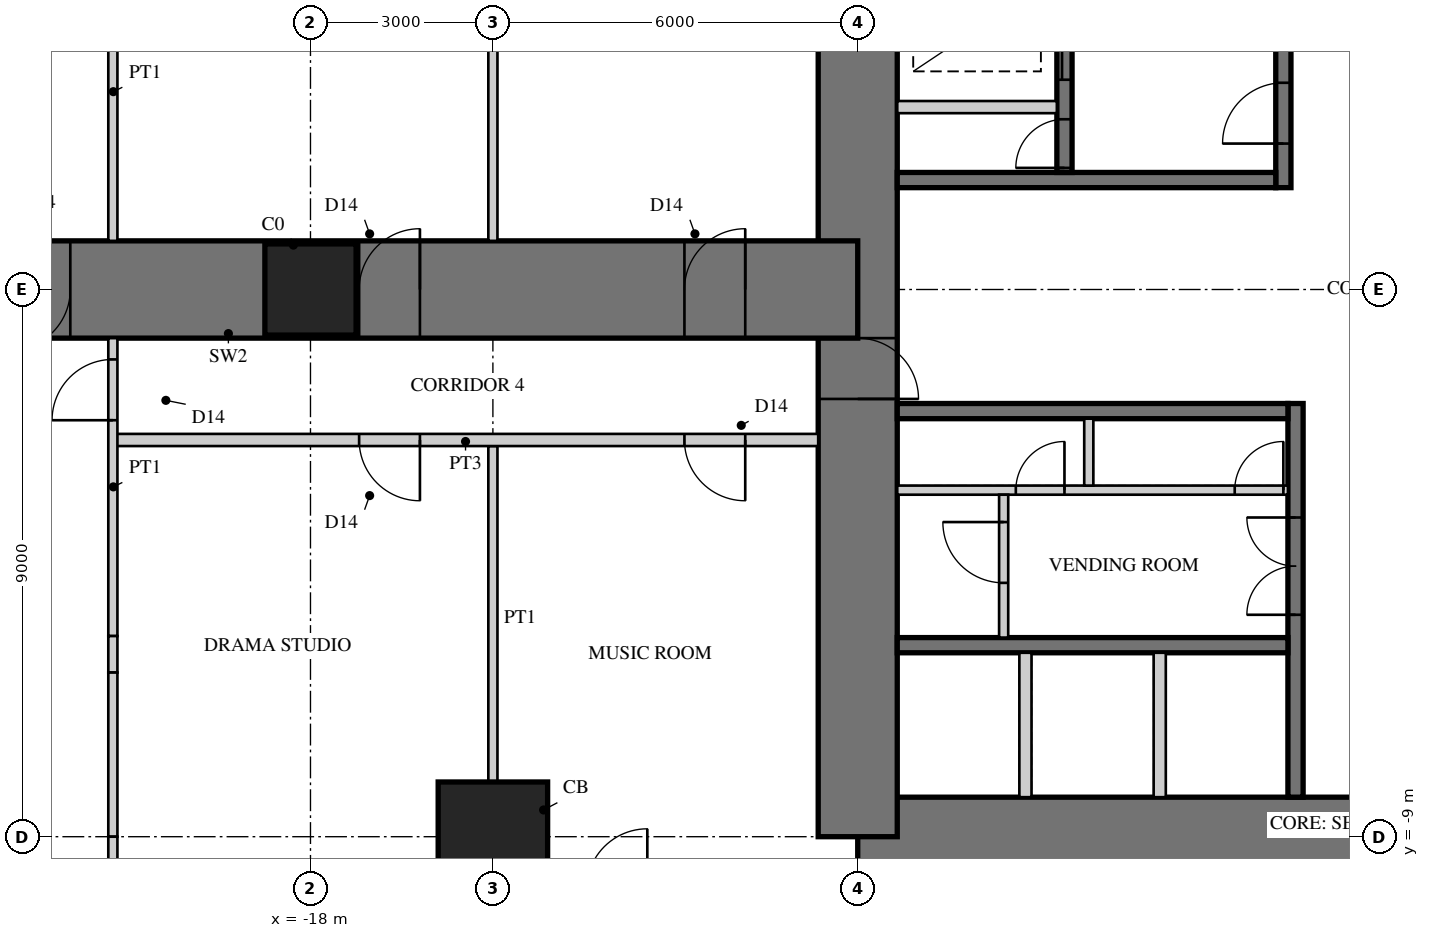
"""IFC4 building model, lengths in metres.
Left out: names, types, materials, properties, quantities, classifications, styles, units other than length and angle.
Written with IfcOpenShell. Run it as: python <this file> out.ifc"""

import sys

from ifc_helpers import new_model, si_unit, direction, frame, frame_2d, origin, origin_2d, place, context, subcontext, project, spatial, rectangle, extrude, element, fill, save


model = new_model("IFC4")
c1 = context("Model", 3, precision=1e-05, world=origin(), true_north=direction((0.0, 1.0)))
c2 = subcontext(c1, "Body", "Model", "MODEL_VIEW")
j1 = project(units=[si_unit("LENGTHUNIT", "METRE"), si_unit("PLANEANGLEUNIT", "RADIAN")], contexts=[c1])
p1 = place(None, origin())
s1 = spatial("IfcSite", under=j1, at=p1, CompositionType="ELEMENT")
p2 = place(p1, origin())
s2 = spatial("IfcBuilding", under=s1, at=p2, CompositionType="ELEMENT")
p3 = place(p2, frame((0.0, 0.0, 14.0)))
s3 = spatial("IfcBuildingStorey", under=s2, at=p3, CompositionType="ELEMENT", Elevation=14.0)
p4 = place(p3, frame((-9.0, -9.0, 0.0), z_axis=(0.0, 0.0, 1.0), x_axis=(1.0, 0.0, 0.0)))
e1 = element("IfcWall", 1, at=p4, inside=s3, PredefinedType="SHEAR", context=c2, shape_type="SweptSolid", body=[
    extrude(rectangle(XDim=18.0, YDim=1.3, at=frame_2d((9.0, 0.0))), origin(), (0.0, 0.0, 1.0), 4.5),
])
p5 = place(p4, frame((9.8, 0.0, 0.0)))
e2 = element("IfcOpeningElement", 2, at=p5, cuts=e1, PredefinedType="OPENING", context=c2, shape_type="SweptSolid", body=[
    extrude(rectangle(XDim=1.0, YDim=2.4, at=frame_2d((0.5, 1.2))), frame((0.0, 0.66, 0.0), z_axis=(0.0, -1.0, 0.0), x_axis=(1.0, 0.0, 0.0)), (0.0, 0.0, 1.0), 1.32),
])
p6 = place(p3, frame((-9.0, 9.0, 0.0), z_axis=(0.0, 0.0, 1.0), x_axis=(0.0, -1.0, 0.0)))
e3 = element("IfcWall", 3, at=p6, inside=s3, PredefinedType="SHEAR", context=c2, shape_type="SweptSolid", body=[
    extrude(rectangle(XDim=18.0, YDim=1.3, at=frame_2d((9.0, 0.0))), origin(), (0.0, 0.0, 1.0), 4.5),
])
p7 = place(p6, frame((9.8, 0.0, 0.0)))
e4 = element("IfcOpeningElement", 4, at=p7, cuts=e3, PredefinedType="OPENING", context=c2, shape_type="SweptSolid", body=[
    extrude(rectangle(XDim=1.0, YDim=2.4, at=frame_2d((0.5, 1.2))), frame((0.0, 0.66, 0.0), z_axis=(0.0, -1.0, 0.0), x_axis=(1.0, 0.0, 0.0)), (0.0, 0.0, 1.0), 1.32),
])
p8 = place(p3, frame((-2.0, 1.675, 0.0), z_axis=(0.0, 0.0, 1.0), x_axis=(0.0, 1.0, 0.0)))
e5 = element("IfcWall", 5, at=p8, inside=s3, PredefinedType="SHEAR", context=c2, shape_type="SweptSolid", body=[
    extrude(rectangle(XDim=6.675, YDim=0.25, at=frame_2d((3.337, 0.0))), origin(), (0.0, 0.0, 1.0), 4.5),
])
p9 = place(p8, frame((0.725, 0.0, 0.0)))
e6 = element("IfcOpeningElement", 6, at=p9, cuts=e5, PredefinedType="OPENING", context=c2, shape_type="SweptSolid", body=[
    extrude(rectangle(XDim=1.0, YDim=2.1, at=frame_2d((0.5, 1.05))), frame((0.0, 0.135, 0.0), z_axis=(0.0, -1.0, 0.0), x_axis=(1.0, 0.0, 0.0)), (0.0, 0.0, 1.0), 0.27),
])
p10 = place(p3, frame((-2.125, 1.8, 0.0), z_axis=(0.0, 0.0, 1.0), x_axis=(-1.0, 0.0, 0.0)))
e7 = element("IfcWall", 7, at=p10, inside=s3, PredefinedType="SHEAR", context=c2, shape_type="SweptSolid", body=[
    extrude(rectangle(XDim=6.225, YDim=0.25, at=frame_2d((3.113, 0.0))), origin(), (0.0, 0.0, 1.0), 4.5),
])
p11 = place(p3, frame((-5.6, 1.925, 0.0), z_axis=(0.0, 0.0, 1.0), x_axis=(0.0, 1.0, 0.0)))
e8 = element("IfcWall", 8, at=p11, inside=s3, PredefinedType="SHEAR", context=c2, shape_type="SweptSolid", body=[
    extrude(rectangle(XDim=3.55, YDim=0.25, at=frame_2d((1.775, 0.0))), origin(), (0.0, 0.0, 1.0), 4.5),
])
p12 = place(p11, frame((1.525, 0.0, 0.0)))
e9 = element("IfcOpeningElement", 9, at=p12, cuts=e8, PredefinedType="OPENING", context=c2, shape_type="SweptSolid", body=[
    extrude(rectangle(XDim=1.1, YDim=2.2, at=frame_2d((0.55, 1.1))), frame((0.0, 0.135, 0.0), z_axis=(0.0, -1.0, 0.0), x_axis=(1.0, 0.0, 0.0)), (0.0, 0.0, 1.0), 0.27),
])
p13 = place(p11, frame((0.075, 0.0, 0.0)))
e10 = element("IfcOpeningElement", 10, at=p13, cuts=e8, PredefinedType="OPENING", context=c2, shape_type="SweptSolid", body=[
    extrude(rectangle(XDim=0.8, YDim=2.1, at=frame_2d((0.4, 1.05))), frame((0.0, 0.135, 0.0), z_axis=(0.0, -1.0, 0.0), x_axis=(1.0, 0.0, 0.0)), (0.0, 0.0, 1.0), 0.27),
])
p14 = place(p3, frame((-5.725, 3.0, 0.0), z_axis=(0.0, 0.0, 1.0), x_axis=(-1.0, 0.0, 0.0)))
e11 = element("IfcWall", 11, at=p14, inside=s3, PredefinedType="PARTITIONING", context=c2, shape_type="SweptSolid", body=[
    extrude(rectangle(XDim=2.625, YDim=0.2, at=frame_2d((1.312, 0.0))), origin(), (0.0, 0.0, 1.0), 4.5),
])
p15 = place(p3, frame((-1.8, -1.875, 0.0), z_axis=(0.0, 0.0, 1.0), x_axis=(0.0, -1.0, 0.0)))
e12 = element("IfcWall", 12, at=p15, inside=s3, PredefinedType="SHEAR", context=c2, shape_type="SweptSolid", body=[
    extrude(rectangle(XDim=6.475, YDim=0.25, at=frame_2d((3.238, 0.0))), origin(), (0.0, 0.0, 1.0), 4.5),
])
p16 = place(p15, frame((1.875, 0.0, 0.0)))
e13 = element("IfcOpeningElement", 13, at=p16, cuts=e12, PredefinedType="OPENING", context=c2, shape_type="SweptSolid", body=[
    extrude(rectangle(XDim=1.6, YDim=2.4, at=frame_2d((0.8, 1.2))), frame((0.0, 0.135, 0.0), z_axis=(0.0, -1.0, 0.0), x_axis=(1.0, 0.0, 0.0)), (0.0, 0.0, 1.0), 0.27),
])
for number, where, z_axis, x_axis in (
    (14, (-1.925, -2.0, 0.0), (0.0, 0.0, 1.0), (-1.0, 0.0, 0.0)),
    (15, (-1.925, -5.85, 0.0), (0.0, 0.0, 1.0), (-1.0, 0.0, 0.0)),
):
    element("IfcWall", number, at=place(p3, frame(where, z_axis=z_axis, x_axis=x_axis)), inside=s3, PredefinedType="SHEAR", context=c2, shape_type="SweptSolid", body=[
        extrude(rectangle(XDim=6.425, YDim=0.25, at=frame_2d((3.212, 0.0))), origin(), (0.0, 0.0, 1.0), 4.5),
    ])
p17 = place(p3, frame((-1.925, -3.3, 0.0), z_axis=(0.0, 0.0, 1.0), x_axis=(-1.0, 0.0, 0.0)))
e16 = element("IfcWall", 16, at=p17, inside=s3, PredefinedType="PARTITIONING", context=c2, shape_type="SweptSolid", body=[
    extrude(rectangle(XDim=6.425, YDim=0.15, at=frame_2d((3.212, 0.0))), origin(), (0.0, 0.0, 1.0), 4.5),
])
p18 = place(p17, frame((0.075, 0.0, 0.0)))
e17 = element("IfcOpeningElement", 17, at=p18, cuts=e16, PredefinedType="OPENING", context=c2, shape_type="SweptSolid", body=[
    extrude(rectangle(XDim=0.8, YDim=2.1, at=frame_2d((0.4, 1.05))), frame((0.0, 0.085, 0.0), z_axis=(0.0, -1.0, 0.0), x_axis=(1.0, 0.0, 0.0)), (0.0, 0.0, 1.0), 0.17),
])
p19 = place(p17, frame((3.675, 0.0, 0.0)))
e18 = element("IfcOpeningElement", 18, at=p19, cuts=e16, PredefinedType="OPENING", context=c2, shape_type="SweptSolid", body=[
    extrude(rectangle(XDim=0.8, YDim=2.1, at=frame_2d((0.4, 1.05))), frame((0.0, 0.085, 0.0), z_axis=(0.0, -1.0, 0.0), x_axis=(1.0, 0.0, 0.0)), (0.0, 0.0, 1.0), 0.17),
])
p20 = place(p3, frame((-5.2, -2.125, 0.0), z_axis=(0.0, 0.0, 1.0), x_axis=(0.0, -1.0, 0.0)))
e19 = element("IfcWall", 19, at=p20, inside=s3, PredefinedType="PARTITIONING", context=c2, shape_type="SweptSolid", body=[
    extrude(rectangle(XDim=1.1, YDim=0.15, at=frame_2d((0.55, 0.0))), origin(), (0.0, 0.0, 1.0), 4.5),
])
for number, where, z_axis, x_axis in (
    (20, (-4.033, -5.975, 0.0), (0.0, 0.0, 1.0), (0.0, -1.0, 0.0)),
    (21, (-6.242, -5.975, 0.0), (0.0, 0.0, 1.0), (0.0, -1.0, 0.0)),
):
    element("IfcWall", number, at=place(p3, frame(where, z_axis=z_axis, x_axis=x_axis)), inside=s3, PredefinedType="PARTITIONING", context=c2, shape_type="SweptSolid", body=[
        extrude(rectangle(XDim=2.375, YDim=0.2, at=frame_2d((1.188, 0.0))), origin(), (0.0, 0.0, 1.0), 4.5),
    ])
p21 = place(p3, frame((-9.0, 0.0, 0.0), z_axis=(0.0, 0.0, 1.0), x_axis=(-1.0, 0.0, 0.0)))
e22 = element("IfcWall", 22, at=p21, inside=s3, PredefinedType="SHEAR", context=c2, shape_type="SweptSolid", body=[
    extrude(rectangle(XDim=18.0, YDim=1.6, at=frame_2d((9.0, 0.0))), origin(), (0.0, 0.0, 1.0), 4.5),
])
p22 = place(p21, frame((1.85, 0.0, 0.0)))
e23 = element("IfcOpeningElement", 23, at=p22, cuts=e22, PredefinedType="OPENING", context=c2, shape_type="SweptSolid", body=[
    extrude(rectangle(XDim=1.0, YDim=2.2, at=frame_2d((0.5, 1.1))), frame((0.0, 0.81, 0.0), z_axis=(0.0, -1.0, 0.0), x_axis=(1.0, 0.0, 0.0)), (0.0, 0.0, 1.0), 1.62),
])
p23 = place(p21, frame((7.2, 0.0, 0.0)))
e24 = element("IfcOpeningElement", 24, at=p23, cuts=e22, PredefinedType="OPENING", context=c2, shape_type="SweptSolid", body=[
    extrude(rectangle(XDim=1.0, YDim=2.2, at=frame_2d((0.5, 1.1))), frame((0.0, 0.81, 0.0), z_axis=(0.0, -1.0, 0.0), x_axis=(1.0, 0.0, 0.0)), (0.0, 0.0, 1.0), 1.62),
])
p24 = place(p21, frame((12.95, 0.0, 0.0)))
e25 = element("IfcOpeningElement", 25, at=p24, cuts=e22, PredefinedType="OPENING", context=c2, shape_type="SweptSolid", body=[
    extrude(rectangle(XDim=1.0, YDim=2.2, at=frame_2d((0.5, 1.1))), frame((0.0, 0.81, 0.0), z_axis=(0.0, -1.0, 0.0), x_axis=(1.0, 0.0, 0.0)), (0.0, 0.0, 1.0), 1.62),
])
p25 = place(p3, frame((-15.0, -9.0, 0.0), z_axis=(0.0, 0.0, 1.0), x_axis=(1.0, 0.0, 0.0)))
e26 = element("IfcColumn", 26, at=p25, inside=s3, PredefinedType="COLUMN", context=c2, shape_type="SweptSolid", body=[
    extrude(rectangle(XDim=1.8, YDim=1.8, at=origin_2d()), origin(), (0.0, 0.0, 1.0), 4.5),
])
p26 = place(p3, frame((-18.0, 0.0, 0.0), z_axis=(0.0, 0.0, 1.0), x_axis=(1.0, 0.0, 0.0)))
e27 = element("IfcColumn", 27, at=p26, inside=s3, PredefinedType="COLUMN", context=c2, shape_type="SweptSolid", body=[
    extrude(rectangle(XDim=1.5, YDim=1.5, at=origin_2d()), origin(), (0.0, 0.0, 1.0), 4.5),
])
p27 = place(p3, frame((-6.6, -3.375, 0.0), z_axis=(0.0, 0.0, 1.0), x_axis=(0.0, -1.0, 0.0)))
e28 = element("IfcWall", 28, at=p27, inside=s3, PredefinedType="PARTITIONING", context=c2, shape_type="SweptSolid", body=[
    extrude(rectangle(XDim=2.35, YDim=0.15, at=frame_2d((1.175, 0.0))), origin(), (0.0, 0.0, 1.0), 4.25),
])
p28 = place(p27, frame((0.45, 0.0, 0.0)))
e29 = element("IfcOpeningElement", 29, at=p28, cuts=e28, PredefinedType="OPENING", context=c2, shape_type="SweptSolid", body=[
    extrude(rectangle(XDim=1.0, YDim=2.1, at=frame_2d((0.5, 1.05))), frame((0.0, 0.085, 0.0), z_axis=(0.0, -1.0, 0.0), x_axis=(1.0, 0.0, 0.0)), (0.0, 0.0, 1.0), 0.17),
])
p29 = place(p3, frame((-15.0, -2.575, 0.0), z_axis=(0.0, 0.0, 1.0), x_axis=(0.0, -1.0, 0.0)))
e30 = element("IfcWall", 30, at=p29, inside=s3, PredefinedType="PARTITIONING", context=c2, shape_type="SweptSolid", body=[
    extrude(rectangle(XDim=5.675, YDim=0.15, at=frame_2d((2.837, 0.0))), origin(), (0.0, 0.0, 1.0), 3.2),
])
p30 = place(p3, frame((-15.0, 8.25, 0.0), z_axis=(0.0, 0.0, 1.0), x_axis=(0.0, -1.0, 0.0)))
e31 = element("IfcWall", 31, at=p30, inside=s3, PredefinedType="PARTITIONING", context=c2, shape_type="SweptSolid", body=[
    extrude(rectangle(XDim=7.45, YDim=0.15, at=frame_2d((3.725, 0.0))), origin(), (0.0, 0.0, 1.0), 3.2),
])
p31 = place(p3, frame((-9.65, -2.475, 0.0), z_axis=(0.0, 0.0, 1.0), x_axis=(-1.0, 0.0, 0.0)))
e32 = element("IfcWall", 32, at=p31, inside=s3, PredefinedType="SOLIDWALL", context=c2, shape_type="SweptSolid", body=[
    extrude(rectangle(XDim=11.6, YDim=0.2, at=frame_2d((5.8, 0.0))), origin(), (0.0, 0.0, 1.0), 4.25),
])
p32 = place(p31, frame((1.2, 0.0, 0.0)))
e33 = element("IfcOpeningElement", 33, at=p32, cuts=e32, PredefinedType="OPENING", context=c2, shape_type="SweptSolid", body=[
    extrude(rectangle(XDim=1.0, YDim=2.2, at=frame_2d((0.5, 1.1))), frame((0.0, 0.11, 0.0), z_axis=(0.0, -1.0, 0.0), x_axis=(1.0, 0.0, 0.0)), (0.0, 0.0, 1.0), 0.22),
])
p33 = place(p31, frame((6.55, 0.0, 0.0)))
e34 = element("IfcOpeningElement", 34, at=p33, cuts=e32, PredefinedType="OPENING", context=c2, shape_type="SweptSolid", body=[
    extrude(rectangle(XDim=1.0, YDim=2.2, at=frame_2d((0.5, 1.1))), frame((0.0, 0.11, 0.0), z_axis=(0.0, -1.0, 0.0), x_axis=(1.0, 0.0, 0.0)), (0.0, 0.0, 1.0), 0.22),
])
p34 = place(p3, frame((-21.25, 5.7, 0.0), z_axis=(0.0, 0.0, 1.0), x_axis=(0.0, -1.0, 0.0)))
e35 = element("IfcWall", 35, at=p34, inside=s3, PredefinedType="PARTITIONING", context=c2, shape_type="SweptSolid", body=[
    extrude(rectangle(XDim=4.9, YDim=0.15, at=frame_2d((2.45, 0.0))), origin(), (0.0, 0.0, 1.0), 3.3),
])
p35 = place(p3, frame((-21.25, -0.8, 0.0), z_axis=(0.0, 0.0, 1.0), x_axis=(0.0, -1.0, 0.0)))
e36 = element("IfcWall", 36, at=p35, inside=s3, PredefinedType="PARTITIONING", context=c2, shape_type="SweptSolid", body=[
    extrude(rectangle(XDim=4.9, YDim=0.15, at=frame_2d((2.45, 0.0))), origin(), (0.0, 0.0, 1.0), 3.3),
])
p36 = place(p35, frame((0.35, 0.0, 0.0)))
e37 = element("IfcOpeningElement", 37, at=p36, cuts=e36, PredefinedType="OPENING", context=c2, shape_type="SweptSolid", body=[
    extrude(rectangle(XDim=1.0, YDim=2.2, at=frame_2d((0.5, 1.1))), frame((0.0, 0.085, 0.0), z_axis=(0.0, -1.0, 0.0), x_axis=(1.0, 0.0, 0.0)), (0.0, 0.0, 1.0), 0.17),
])
p37 = place(p3, frame((-21.25, -5.7, 0.0), z_axis=(0.0, 0.0, 1.0), x_axis=(0.0, -1.0, 0.0)))
e38 = element("IfcWall", 38, at=p37, inside=s3, PredefinedType="PARTITIONING", context=c2, shape_type="SweptSolid", body=[
    extrude(rectangle(XDim=0.6, YDim=0.15, at=frame_2d((0.3, 0.0))), origin(), (0.0, 0.0, 1.0), 4.25),
])
p38 = place(p3, frame((-21.25, -6.3, 0.0), z_axis=(0.0, 0.0, 1.0), x_axis=(0.0, -1.0, 0.0)))
e39 = element("IfcWall", 39, at=p38, inside=s3, PredefinedType="PARTITIONING", context=c2, shape_type="SweptSolid", body=[
    extrude(rectangle(XDim=2.7, YDim=0.15, at=frame_2d((1.35, 0.0))), origin(), (0.0, 0.0, 1.0), 3.3),
])
p39 = place(p3, frame((-21.25, -9.0, 0.0), z_axis=(0.0, 0.0, 1.0), x_axis=(0.0, -1.0, 0.0)))
e40 = element("IfcWall", 40, at=p39, inside=s3, PredefinedType="PARTITIONING", context=c2, shape_type="SweptSolid", body=[
    extrude(rectangle(XDim=0.72, YDim=0.15, at=frame_2d((0.36, 0.0))), origin(), (0.0, 0.0, 1.0), 4.25),
])
p40 = place(p28, frame((1.0, 0.0, 0.0), z_axis=(0.0, 0.0, 1.0), x_axis=(-1.0, 0.0, 0.0)))
e41 = element("IfcDoor", 41, at=p40, inside=s3, OperationType="SINGLE_SWING_RIGHT", PredefinedType="DOOR", context=c2, shape_type="SweptSolid", body=[
    extrude(rectangle(XDim=1.0, YDim=2.1, at=frame_2d((0.5, 1.05))), frame((0.0, 0.025, 0.0), z_axis=(0.0, -1.0, 0.0), x_axis=(1.0, 0.0, 0.0)), (0.0, 0.0, 1.0), 0.05),
])
fill(e29, e41)
p41 = place(p32, origin())
e42 = element("IfcDoor", 42, at=p41, inside=s3, OperationType="SINGLE_SWING_LEFT", PredefinedType="DOOR", context=c2, shape_type="SweptSolid", body=[
    extrude(rectangle(XDim=1.0, YDim=2.2, at=frame_2d((0.5, 1.1))), frame((0.0, 0.025, 0.0), z_axis=(0.0, -1.0, 0.0), x_axis=(1.0, 0.0, 0.0)), (0.0, 0.0, 1.0), 0.05),
])
fill(e33, e42)
p42 = place(p33, origin())
e43 = element("IfcDoor", 43, at=p42, inside=s3, OperationType="SINGLE_SWING_LEFT", PredefinedType="DOOR", context=c2, shape_type="SweptSolid", body=[
    extrude(rectangle(XDim=1.0, YDim=2.2, at=frame_2d((0.5, 1.1))), frame((0.0, 0.025, 0.0), z_axis=(0.0, -1.0, 0.0), x_axis=(1.0, 0.0, 0.0)), (0.0, 0.0, 1.0), 0.05),
])
fill(e34, e43)
p43 = place(p36, frame((1.0, 0.0, 0.0), z_axis=(0.0, 0.0, 1.0), x_axis=(-1.0, 0.0, 0.0)))
e44 = element("IfcDoor", 44, at=p43, inside=s3, OperationType="SINGLE_SWING_LEFT", PredefinedType="DOOR", context=c2, shape_type="SweptSolid", body=[
    extrude(rectangle(XDim=1.0, YDim=2.2, at=frame_2d((0.5, 1.1))), frame((0.0, 0.025, 0.0), z_axis=(0.0, -1.0, 0.0), x_axis=(1.0, 0.0, 0.0)), (0.0, 0.0, 1.0), 0.05),
])
fill(e37, e44)
p44 = place(p22, frame((1.0, 0.0, 0.0), z_axis=(0.0, 0.0, 1.0), x_axis=(-1.0, 0.0, 0.0)))
e45 = element("IfcDoor", 45, at=p44, inside=s3, OperationType="SINGLE_SWING_RIGHT", PredefinedType="DOOR", context=c2, shape_type="SweptSolid", body=[
    extrude(rectangle(XDim=1.0, YDim=2.2, at=frame_2d((0.5, 1.1))), frame((0.0, 0.025, 0.0), z_axis=(0.0, -1.0, 0.0), x_axis=(1.0, 0.0, 0.0)), (0.0, 0.0, 1.0), 0.05),
])
fill(e23, e45)
p45 = place(p23, frame((1.0, 0.0, 0.0), z_axis=(0.0, 0.0, 1.0), x_axis=(-1.0, 0.0, 0.0)))
e46 = element("IfcDoor", 46, at=p45, inside=s3, OperationType="SINGLE_SWING_RIGHT", PredefinedType="DOOR", context=c2, shape_type="SweptSolid", body=[
    extrude(rectangle(XDim=1.0, YDim=2.2, at=frame_2d((0.5, 1.1))), frame((0.0, 0.025, 0.0), z_axis=(0.0, -1.0, 0.0), x_axis=(1.0, 0.0, 0.0)), (0.0, 0.0, 1.0), 0.05),
])
fill(e24, e46)
p46 = place(p24, origin())
e47 = element("IfcDoor", 47, at=p46, inside=s3, OperationType="SINGLE_SWING_RIGHT", PredefinedType="DOOR", context=c2, shape_type="SweptSolid", body=[
    extrude(rectangle(XDim=1.0, YDim=2.2, at=frame_2d((0.5, 1.1))), frame((0.0, 0.025, 0.0), z_axis=(0.0, -1.0, 0.0), x_axis=(1.0, 0.0, 0.0)), (0.0, 0.0, 1.0), 0.05),
])
fill(e25, e47)
p47 = place(p7, origin())
e48 = element("IfcDoor", 48, at=p47, inside=s3, OperationType="SINGLE_SWING_RIGHT", PredefinedType="DOOR", context=c2, shape_type="SweptSolid", body=[
    extrude(rectangle(XDim=1.0, YDim=2.4, at=frame_2d((0.5, 1.2))), frame((0.0, 0.055, 0.0), z_axis=(0.0, -1.0, 0.0), x_axis=(1.0, 0.0, 0.0)), (0.0, 0.0, 1.0), 0.05),
])
fill(e4, e48)
p48 = place(p9, origin())
e49 = element("IfcDoor", 49, at=p48, inside=s3, OperationType="SINGLE_SWING_LEFT", PredefinedType="DOOR", context=c2, shape_type="SweptSolid", body=[
    extrude(rectangle(XDim=1.0, YDim=2.1, at=frame_2d((0.5, 1.05))), frame((0.0, 0.025, 0.0), z_axis=(0.0, -1.0, 0.0), x_axis=(1.0, 0.0, 0.0)), (0.0, 0.0, 1.0), 0.05),
])
fill(e6, e49)
p49 = place(p12, origin())
e50 = element("IfcDoor", 50, at=p49, inside=s3, OperationType="DOUBLE_DOOR_SLIDING", PredefinedType="DOOR", context=c2, shape_type="SweptSolid", body=[
    extrude(rectangle(XDim=1.1, YDim=2.2, at=frame_2d((0.55, 1.1))), frame((0.0, 0.025, 0.0), z_axis=(0.0, -1.0, 0.0), x_axis=(1.0, 0.0, 0.0)), (0.0, 0.0, 1.0), 0.05),
])
fill(e9, e50)
p50 = place(p13, origin())
e51 = element("IfcDoor", 51, at=p50, inside=s3, OperationType="SINGLE_SWING_LEFT", PredefinedType="DOOR", context=c2, shape_type="SweptSolid", body=[
    extrude(rectangle(XDim=0.8, YDim=2.1, at=frame_2d((0.4, 1.05))), frame((0.0, 0.025, 0.0), z_axis=(0.0, -1.0, 0.0), x_axis=(1.0, 0.0, 0.0)), (0.0, 0.0, 1.0), 0.05),
])
fill(e10, e51)
p51 = place(p16, frame((1.6, 0.0, 0.0), z_axis=(0.0, 0.0, 1.0), x_axis=(-1.0, 0.0, 0.0)))
e52 = element("IfcDoor", 52, at=p51, inside=s3, OperationType="DOUBLE_DOOR_SINGLE_SWING", PredefinedType="DOOR", context=c2, shape_type="SweptSolid", body=[
    extrude(rectangle(XDim=1.6, YDim=2.4, at=frame_2d((0.8, 1.2))), frame((0.0, 0.025, 0.0), z_axis=(0.0, -1.0, 0.0), x_axis=(1.0, 0.0, 0.0)), (0.0, 0.0, 1.0), 0.05),
])
fill(e13, e52)
p52 = place(p18, frame((0.8, 0.0, 0.0), z_axis=(0.0, 0.0, 1.0), x_axis=(-1.0, 0.0, 0.0)))
e53 = element("IfcDoor", 53, at=p52, inside=s3, OperationType="SINGLE_SWING_RIGHT", PredefinedType="DOOR", context=c2, shape_type="SweptSolid", body=[
    extrude(rectangle(XDim=0.8, YDim=2.1, at=frame_2d((0.4, 1.05))), frame((0.0, 0.025, 0.0), z_axis=(0.0, -1.0, 0.0), x_axis=(1.0, 0.0, 0.0)), (0.0, 0.0, 1.0), 0.05),
])
fill(e17, e53)
p53 = place(p19, frame((0.8, 0.0, 0.0), z_axis=(0.0, 0.0, 1.0), x_axis=(-1.0, 0.0, 0.0)))
e54 = element("IfcDoor", 54, at=p53, inside=s3, OperationType="SINGLE_SWING_RIGHT", PredefinedType="DOOR", context=c2, shape_type="SweptSolid", body=[
    extrude(rectangle(XDim=0.8, YDim=2.1, at=frame_2d((0.4, 1.05))), frame((0.0, 0.025, 0.0), z_axis=(0.0, -1.0, 0.0), x_axis=(1.0, 0.0, 0.0)), (0.0, 0.0, 1.0), 0.05),
])
fill(e18, e54)
save(model, sys.argv[1])
